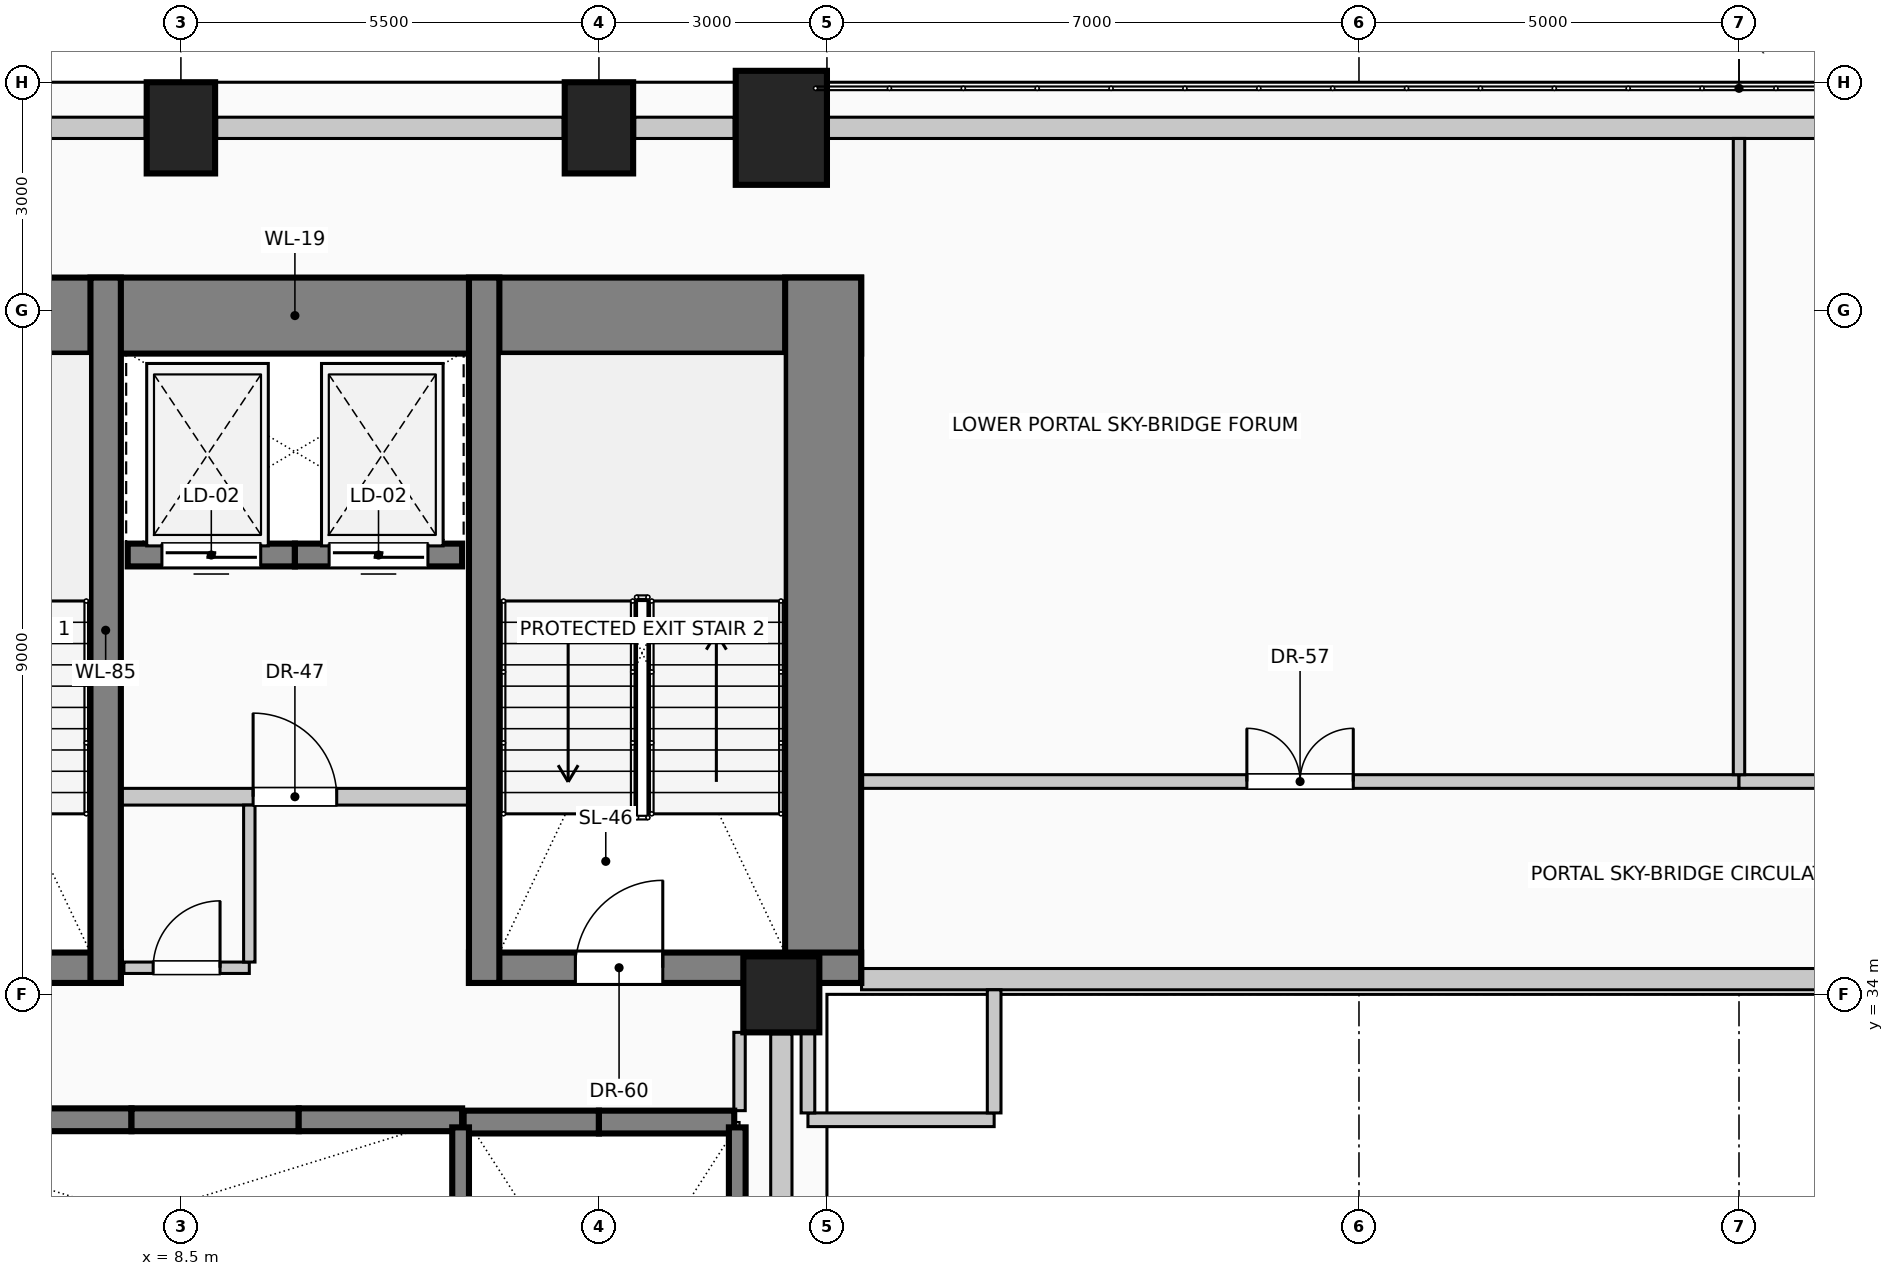
"""IFC4 building model, lengths in metres.
Left out: names, types, materials, properties, quantities, classifications, styles, units other than length and angle.
Written with IfcOpenShell. Run it as: python <this file> out.ifc"""

import sys

from ifc_helpers import new_model, si_unit, direction, frame, frame_2d, origin, origin_2d, place, context, subcontext, project, spatial, rectangle, circle, extrude, element, fill, save


model = new_model("IFC4")
c1 = context("Model", 3, precision=1e-05, world=origin(), true_north=direction((0.0, 1.0)))
c2 = subcontext(c1, "Body", "Model", "MODEL_VIEW")
j1 = project(units=[si_unit("LENGTHUNIT", "METRE"), si_unit("PLANEANGLEUNIT", "RADIAN")], contexts=[c1])
p1 = place(None, origin())
s1 = spatial("IfcSite", under=j1, at=p1, CompositionType="ELEMENT")
p2 = place(p1, origin())
s2 = spatial("IfcBuilding", under=s1, at=p2, CompositionType="ELEMENT")
p3 = place(p2, frame((0.0, 0.0, 42.6)))
s3 = spatial("IfcBuildingStorey", under=s2, at=p3, CompositionType="ELEMENT", Elevation=42.6)
p4 = place(p3, frame((2.55, 42.93, 0.0), z_axis=(0.0, 0.0, 1.0), x_axis=(1.0, 0.0, 0.0)))
e1 = element("IfcWall", 1, at=p4, inside=s3, PredefinedType="SHEAR", context=c2, shape_type="SweptSolid", body=[
    extrude(rectangle(XDim=14.9, YDim=1.0, at=frame_2d((7.45, 0.0))), origin(), (0.0, 0.0, 1.0), 4.0),
])
p5 = place(p3, frame((16.95, 34.15, 0.0), z_axis=(0.0, 0.0, 1.0), x_axis=(0.0, 1.0, 0.0)))
e2 = element("IfcWall", 2, at=p5, inside=s3, PredefinedType="SHEAR", context=c2, shape_type="SweptSolid", body=[
    extrude(rectangle(XDim=9.28, YDim=1.0, at=frame_2d((4.64, 0.0))), origin(), (0.0, 0.0, 1.0), 4.0),
])
p6 = place(p3, frame((2.55, 34.35, 0.0), z_axis=(0.0, 0.0, 1.0), x_axis=(1.0, 0.0, 0.0)))
e3 = element("IfcWall", 3, at=p6, inside=s3, PredefinedType="SHEAR", context=c2, shape_type="SweptSolid", body=[
    extrude(rectangle(XDim=5.16, YDim=0.4, at=frame_2d((2.58, 0.0))), origin(), (0.0, 0.0, 1.0), 4.0),
])
p7 = place(p6, frame((2.4, 0.0, 0.0)))
e4 = element("IfcOpeningElement", 4, at=p7, cuts=e3, PredefinedType="OPENING", context=c2, shape_type="SweptSolid", body=[
    extrude(rectangle(XDim=1.15, YDim=2.2, at=frame_2d((0.575, 1.1))), frame((0.0, 0.21, 0.0), z_axis=(0.0, -1.0, 0.0), x_axis=(1.0, 0.0, 0.0)), (0.0, 0.0, 1.0), 0.42),
])
p8 = place(p3, frame((12.29, 34.35, 0.0), z_axis=(0.0, 0.0, 1.0), x_axis=(1.0, 0.0, 0.0)))
e5 = element("IfcWall", 5, at=p8, inside=s3, PredefinedType="SHEAR", context=c2, shape_type="SweptSolid", body=[
    extrude(rectangle(XDim=5.16, YDim=0.4, at=frame_2d((2.58, 0.0))), origin(), (0.0, 0.0, 1.0), 4.0),
])
p9 = place(p8, frame((1.4, 0.0, 0.0)))
e6 = element("IfcOpeningElement", 6, at=p9, cuts=e5, PredefinedType="OPENING", context=c2, shape_type="SweptSolid", body=[
    extrude(rectangle(XDim=1.15, YDim=2.2, at=frame_2d((0.575, 1.1))), frame((0.0, 0.21, 0.0), z_axis=(0.0, -1.0, 0.0), x_axis=(1.0, 0.0, 0.0)), (0.0, 0.0, 1.0), 0.42),
])
for number, where, z_axis, x_axis in (
    (7, (7.51, 34.15, 0.0), (0.0, 0.0, 1.0), (0.0, 1.0, 0.0)),
    (8, (12.49, 34.15, 0.0), (0.0, 0.0, 1.0), (0.0, 1.0, 0.0)),
):
    element("IfcWall", number, at=place(p3, frame(where, z_axis=z_axis, x_axis=x_axis)), inside=s3, PredefinedType="SHEAR", context=c2, shape_type="SweptSolid", body=[
        extrude(rectangle(XDim=9.28, YDim=0.4, at=frame_2d((4.64, 0.0))), origin(), (0.0, 0.0, 1.0), 4.0),
    ])
for number, where, z_axis, x_axis in (
    (9, (8.5, 45.4, 0.0), (0.0, 0.0, 1.0), (1.0, 0.0, 0.0)),
    (10, (14.0, 45.4, 0.0), (0.0, 0.0, 1.0), (1.0, 0.0, 0.0)),
):
    element("IfcColumn", number, at=place(p3, frame(where, z_axis=z_axis, x_axis=x_axis)), inside=s3, PredefinedType="COLUMN", context=c2, shape_type="SweptSolid", body=[
        extrude(rectangle(XDim=0.9, YDim=1.2, at=origin_2d()), origin(), (0.0, 0.0, 1.0), 4.0),
    ])
p10 = place(p3, frame((16.4, 45.4, 0.0), z_axis=(0.0, 0.0, 1.0), x_axis=(1.0, 0.0, 0.0)))
e11 = element("IfcColumn", 11, at=p10, inside=s3, PredefinedType="COLUMN", context=c2, shape_type="SweptSolid", body=[
    extrude(rectangle(XDim=1.2, YDim=1.5, at=origin_2d()), origin(), (0.0, 0.0, 1.0), 4.0),
])
p11 = place(p3, frame((16.4, 34.0, 0.0), z_axis=(0.0, 0.0, 1.0), x_axis=(1.0, 0.0, 0.0)))
e12 = element("IfcColumn", 12, at=p11, inside=s3, PredefinedType="COLUMN", context=c2, shape_type="SweptSolid", body=[
    extrude(circle(Radius=0.5, at=origin_2d()), origin(), (0.0, 0.0, 1.0), 4.0),
])
p12 = place(p3, frame((4.07, 45.4, 0.0), z_axis=(0.0, 0.0, 1.0), x_axis=(1.0, 0.0, 0.0)))
e13 = element("IfcWall", 13, at=p12, inside=s3, PredefinedType="SOLIDWALL", context=c2, shape_type="SweptSolid", body=[
    extrude(rectangle(XDim=3.96, YDim=0.28, at=frame_2d((1.98, 0.0))), origin(), (0.0, 0.0, 1.0), 2.85),
])
p13 = place(p3, frame((8.97, 45.4, 0.0), z_axis=(0.0, 0.0, 1.0), x_axis=(1.0, 0.0, 0.0)))
e14 = element("IfcWall", 14, at=p13, inside=s3, PredefinedType="SOLIDWALL", context=c2, shape_type="SweptSolid", body=[
    extrude(rectangle(XDim=4.56, YDim=0.28, at=frame_2d((2.28, 0.0))), origin(), (0.0, 0.0, 1.0), 2.85),
])
p14 = place(p3, frame((14.47, 45.4, 0.0), z_axis=(0.0, 0.0, 1.0), x_axis=(1.0, 0.0, 0.0)))
e15 = element("IfcWall", 15, at=p14, inside=s3, PredefinedType="SOLIDWALL", context=c2, shape_type="SweptSolid", body=[
    extrude(rectangle(XDim=1.31, YDim=0.28, at=frame_2d((0.655, 0.0))), origin(), (0.0, 0.0, 1.0), 2.85),
])
p15 = place(p3, frame((17.02, 45.4, 0.0), z_axis=(0.0, 0.0, 1.0), x_axis=(1.0, 0.0, 0.0)))
e16 = element("IfcWall", 16, at=p15, inside=s3, PredefinedType="SOLIDWALL", context=c2, shape_type="SweptSolid", body=[
    extrude(rectangle(XDim=23.96, YDim=0.28, at=frame_2d((11.98, 0.0))), origin(), (0.0, 0.0, 1.0), 0.7),
])
p16 = place(p3, frame((16.4, 33.48, 0.0), z_axis=(0.0, 0.0, 1.0), x_axis=(0.0, -1.0, 0.0)))
e17 = element("IfcWall", 17, at=p16, inside=s3, PredefinedType="SOLIDWALL", context=c2, shape_type="SweptSolid", body=[
    extrude(rectangle(XDim=6.71, YDim=0.28, at=frame_2d((3.355, 0.0))), origin(), (0.0, 0.0, 1.0), 3.0),
])
p17 = place(p3, frame((40.545, 34.2, 0.0), z_axis=(0.0, 0.0, 1.0), x_axis=(-1.0, 0.0, 0.0)))
e18 = element("IfcWall", 18, at=p17, inside=s3, PredefinedType="SOLIDWALL", context=c2, shape_type="SweptSolid", body=[
    extrude(rectangle(XDim=23.09, YDim=0.28, at=frame_2d((11.545, 0.0))), origin(), (0.0, 0.0, 1.0), 0.7),
])
for number, where, z_axis, x_axis in (
    (19, (12.22, 32.32, 0.0), (0.0, 0.0, 1.0), (1.0, 0.0, 0.0)),
    (20, (14.0, 32.32, 0.0), (0.0, 0.0, 1.0), (1.0, 0.0, 0.0)),
):
    element("IfcWall", number, at=place(p3, frame(where, z_axis=z_axis, x_axis=x_axis)), inside=s3, PredefinedType="SOLIDWALL", context=c2, shape_type="SweptSolid", body=[
        extrude(rectangle(XDim=1.78, YDim=0.3, at=frame_2d((0.89, 0.0))), origin(), (0.0, 0.0, 1.0), 4.0),
    ])
p18 = place(p3, frame((5.65, 32.35, 0.0), z_axis=(0.0, 0.0, 1.0), x_axis=(1.0, 0.0, 0.0)))
e21 = element("IfcWall", 21, at=p18, inside=s3, PredefinedType="SOLIDWALL", context=c2, shape_type="SweptSolid", body=[
    extrude(rectangle(XDim=2.2, YDim=0.3, at=frame_2d((1.1, 0.0))), origin(), (0.0, 0.0, 1.0), 4.0),
])
p19 = place(p3, frame((7.85, 32.35, 0.0), z_axis=(0.0, 0.0, 1.0), x_axis=(1.0, 0.0, 0.0)))
e22 = element("IfcWall", 22, at=p19, inside=s3, PredefinedType="SOLIDWALL", context=c2, shape_type="SweptSolid", body=[
    extrude(rectangle(XDim=2.2, YDim=0.3, at=frame_2d((1.1, 0.0))), origin(), (0.0, 0.0, 1.0), 4.0),
])
p20 = place(p3, frame((10.05, 32.35, 0.0), z_axis=(0.0, 0.0, 1.0), x_axis=(1.0, 0.0, 0.0)))
e23 = element("IfcWall", 23, at=p20, inside=s3, PredefinedType="SOLIDWALL", context=c2, shape_type="SweptSolid", body=[
    extrude(rectangle(XDim=2.15, YDim=0.3, at=frame_2d((1.075, 0.0))), origin(), (0.0, 0.0, 1.0), 4.0),
])
p21 = place(p3, frame((10.0, 39.78, 0.0), z_axis=(0.0, 0.0, 1.0), x_axis=(-1.0, 0.0, 0.0)))
e24 = element("IfcWall", 24, at=p21, inside=s3, PredefinedType="SOLIDWALL", context=c2, shape_type="SweptSolid", body=[
    extrude(rectangle(XDim=2.2, YDim=0.3, at=frame_2d((1.1, 0.0))), origin(), (0.0, 0.0, 1.0), 4.0),
])
p22 = place(p21, frame((0.45, 0.0, 0.0)))
e25 = element("IfcOpeningElement", 25, at=p22, cuts=e24, PredefinedType="OPENING", context=c2, shape_type="SweptSolid", body=[
    extrude(rectangle(XDim=1.3, YDim=2.25, at=frame_2d((0.65, 1.125))), frame((0.0, 0.16, 0.0), z_axis=(0.0, -1.0, 0.0), x_axis=(1.0, 0.0, 0.0)), (0.0, 0.0, 1.0), 0.32),
])
p23 = place(p3, frame((12.2, 39.78, 0.0), z_axis=(0.0, 0.0, 1.0), x_axis=(-1.0, 0.0, 0.0)))
e26 = element("IfcWall", 26, at=p23, inside=s3, PredefinedType="SOLIDWALL", context=c2, shape_type="SweptSolid", body=[
    extrude(rectangle(XDim=2.2, YDim=0.3, at=frame_2d((1.1, 0.0))), origin(), (0.0, 0.0, 1.0), 4.0),
])
p24 = place(p23, frame((0.45, 0.0, 0.0)))
e27 = element("IfcOpeningElement", 27, at=p24, cuts=e26, PredefinedType="OPENING", context=c2, shape_type="SweptSolid", body=[
    extrude(rectangle(XDim=1.3, YDim=2.25, at=frame_2d((0.65, 1.125))), frame((0.0, 0.16, 0.0), z_axis=(0.0, -1.0, 0.0), x_axis=(1.0, 0.0, 0.0)), (0.0, 0.0, 1.0), 0.32),
])
for number, where, z_axis, x_axis in (
    (28, (12.18, 26.8, 0.0), (0.0, 0.0, 1.0), (0.0, 1.0, 0.0)),
    (29, (15.82, 26.8, 0.0), (0.0, 0.0, 1.0), (0.0, 1.0, 0.0)),
):
    element("IfcWall", number, at=place(p3, frame(where, z_axis=z_axis, x_axis=x_axis)), inside=s3, PredefinedType="SOLIDWALL", context=c2, shape_type="SweptSolid", body=[
        extrude(rectangle(XDim=5.45, YDim=0.22, at=frame_2d((2.725, 0.0))), origin(), (0.0, 0.0, 1.0), 4.0),
    ])
p25 = place(p3, frame((7.51, 36.6, 0.0), z_axis=(0.0, 0.0, 1.0), x_axis=(1.0, 0.0, 0.0)))
e30 = element("IfcWall", 30, at=p25, inside=s3, PredefinedType="PARTITIONING", context=c2, shape_type="SweptSolid", body=[
    extrude(rectangle(XDim=4.98, YDim=0.22, at=frame_2d((2.49, 0.0))), origin(), (0.0, 0.0, 1.0), 3.7),
])
p26 = place(p25, frame((1.94, 0.0, 0.0)))
e31 = element("IfcOpeningElement", 31, at=p26, cuts=e30, PredefinedType="OPENING", context=c2, shape_type="SweptSolid", body=[
    extrude(rectangle(XDim=1.1, YDim=2.2, at=frame_2d((0.55, 1.1))), frame((0.0, 0.12, 0.0), z_axis=(0.0, -1.0, 0.0), x_axis=(1.0, 0.0, 0.0)), (0.0, 0.0, 1.0), 0.24),
])
p27 = place(p3, frame((16.75, 32.35, 0.0), z_axis=(0.0, 0.0, 1.0), x_axis=(1.0, 0.0, 0.0)))
e32 = element("IfcWall", 32, at=p27, inside=s3, PredefinedType="PARTITIONING", context=c2, shape_type="SweptSolid", body=[
    extrude(rectangle(XDim=2.45, YDim=0.18, at=frame_2d((1.225, 0.0))), origin(), (0.0, 0.0, 1.0), 3.7),
])
p28 = place(p3, frame((7.75, 34.35, 0.0), z_axis=(0.0, 0.0, 1.0), x_axis=(1.0, 0.0, 0.0)))
e33 = element("IfcWall", 33, at=p28, inside=s3, PredefinedType="PARTITIONING", context=c2, shape_type="SweptSolid", body=[
    extrude(rectangle(XDim=1.65, YDim=0.15, at=frame_2d((0.825, 0.0))), origin(), (0.0, 0.0, 1.0), 3.7),
])
p29 = place(p28, frame((0.385, 0.0, 0.0)))
e34 = element("IfcOpeningElement", 34, at=p29, cuts=e33, PredefinedType="OPENING", context=c2, shape_type="SweptSolid", body=[
    extrude(rectangle(XDim=0.88, YDim=2.1, at=frame_2d((0.44, 1.05))), frame((0.0, 0.085, 0.0), z_axis=(0.0, -1.0, 0.0), x_axis=(1.0, 0.0, 0.0)), (0.0, 0.0, 1.0), 0.17),
])
p30 = place(p3, frame((17.45, 36.8, 0.0), z_axis=(0.0, 0.0, 1.0), x_axis=(1.0, 0.0, 0.0)))
e35 = element("IfcWall", 35, at=p30, inside=s3, PredefinedType="PARTITIONING", context=c2, shape_type="SweptSolid", body=[
    extrude(rectangle(XDim=11.55, YDim=0.18, at=frame_2d((5.775, 0.0))), origin(), (0.0, 0.0, 1.0), 3.7),
])
p31 = place(p30, frame((5.075, 0.0, 0.0)))
e36 = element("IfcOpeningElement", 36, at=p31, cuts=e35, PredefinedType="OPENING", context=c2, shape_type="SweptSolid", body=[
    extrude(rectangle(XDim=1.4, YDim=2.2, at=frame_2d((0.7, 1.1))), frame((0.0, 0.1, 0.0), z_axis=(0.0, -1.0, 0.0), x_axis=(1.0, 0.0, 0.0)), (0.0, 0.0, 1.0), 0.2),
])
p32 = place(p3, frame((29.0, 36.8, 0.0), z_axis=(0.0, 0.0, 1.0), x_axis=(1.0, 0.0, 0.0)))
e37 = element("IfcWall", 37, at=p32, inside=s3, PredefinedType="PARTITIONING", context=c2, shape_type="SweptSolid", body=[
    extrude(rectangle(XDim=11.55, YDim=0.18, at=frame_2d((5.775, 0.0))), origin(), (0.0, 0.0, 1.0), 3.7),
])
p33 = place(p32, frame((5.3, 0.0, 0.0)))
e38 = element("IfcOpeningElement", 38, at=p33, cuts=e37, PredefinedType="OPENING", context=c2, shape_type="SweptSolid", body=[
    extrude(rectangle(XDim=0.95, YDim=2.15, at=frame_2d((0.475, 1.075))), frame((0.0, 0.1, 0.0), z_axis=(0.0, -1.0, 0.0), x_axis=(1.0, 0.0, 0.0)), (0.0, 0.0, 1.0), 0.2),
])
p34 = place(p3, frame((9.4, 34.425, 0.0), z_axis=(0.0, 0.0, 1.0), x_axis=(0.0, 1.0, 0.0)))
e39 = element("IfcWall", 39, at=p34, inside=s3, PredefinedType="PARTITIONING", context=c2, shape_type="SweptSolid", body=[
    extrude(rectangle(XDim=2.065, YDim=0.15, at=frame_2d((1.032, 0.0))), origin(), (0.0, 0.0, 1.0), 3.7),
])
p35 = place(p3, frame((15.85, 32.47, 0.0), z_axis=(0.0, 0.0, 1.0), x_axis=(0.0, 1.0, 0.0)))
e40 = element("IfcWall", 40, at=p35, inside=s3, PredefinedType="PARTITIONING", context=c2, shape_type="SweptSolid", body=[
    extrude(rectangle(XDim=1.03, YDim=0.15, at=frame_2d((0.515, 0.0))), origin(), (0.0, 0.0, 1.0), 3.7),
])
p36 = place(p3, frame((16.75, 32.44, 0.0), z_axis=(0.0, 0.0, 1.0), x_axis=(0.0, 1.0, 0.0)))
e41 = element("IfcWall", 41, at=p36, inside=s3, PredefinedType="PARTITIONING", context=c2, shape_type="SweptSolid", body=[
    extrude(rectangle(XDim=1.06, YDim=0.18, at=frame_2d((0.53, 0.0))), origin(), (0.0, 0.0, 1.0), 3.7),
])
p37 = place(p3, frame((19.2, 32.44, 0.0), z_axis=(0.0, 0.0, 1.0), x_axis=(0.0, 1.0, 0.0)))
e42 = element("IfcWall", 42, at=p37, inside=s3, PredefinedType="PARTITIONING", context=c2, shape_type="SweptSolid", body=[
    extrude(rectangle(XDim=1.62, YDim=0.18, at=frame_2d((0.81, 0.0))), origin(), (0.0, 0.0, 1.0), 3.7),
])
p38 = place(p3, frame((29.0, 36.89, 0.0), z_axis=(0.0, 0.0, 1.0), x_axis=(0.0, 1.0, 0.0)))
e43 = element("IfcWall", 43, at=p38, inside=s3, PredefinedType="PARTITIONING", context=c2, shape_type="SweptSolid", body=[
    extrude(rectangle(XDim=8.37, YDim=0.15, at=frame_2d((4.185, 0.0))), origin(), (0.0, 0.0, 1.0), 3.7),
])
p39 = place(p22, origin())
e44 = element("IfcDoor", 44, at=p39, inside=s3, OperationType="SLIDING_TO_LEFT", PredefinedType="DOOR", context=c2, shape_type="SweptSolid", body=[
    extrude(rectangle(XDim=1.3, YDim=2.25, at=frame_2d((0.65, 1.125))), frame((0.0, 0.025, 0.0), z_axis=(0.0, -1.0, 0.0), x_axis=(1.0, 0.0, 0.0)), (0.0, 0.0, 1.0), 0.05),
])
fill(e25, e44)
p40 = place(p24, origin())
e45 = element("IfcDoor", 45, at=p40, inside=s3, OperationType="SLIDING_TO_RIGHT", PredefinedType="DOOR", context=c2, shape_type="SweptSolid", body=[
    extrude(rectangle(XDim=1.3, YDim=2.25, at=frame_2d((0.65, 1.125))), frame((0.0, 0.025, 0.0), z_axis=(0.0, -1.0, 0.0), x_axis=(1.0, 0.0, 0.0)), (0.0, 0.0, 1.0), 0.05),
])
fill(e27, e45)
p41 = place(p9, origin())
e46 = element("IfcDoor", 46, at=p41, inside=s3, OperationType="SINGLE_SWING_RIGHT", PredefinedType="DOOR", context=c2, shape_type="SweptSolid", body=[
    extrude(rectangle(XDim=1.15, YDim=2.2, at=frame_2d((0.575, 1.1))), frame((0.0, 0.025, 0.0), z_axis=(0.0, -1.0, 0.0), x_axis=(1.0, 0.0, 0.0)), (0.0, 0.0, 1.0), 0.05),
])
fill(e6, e46)
p42 = place(p26, origin())
e47 = element("IfcDoor", 47, at=p42, inside=s3, OperationType="SINGLE_SWING_LEFT", PredefinedType="DOOR", context=c2, shape_type="SweptSolid", body=[
    extrude(rectangle(XDim=1.1, YDim=2.2, at=frame_2d((0.55, 1.1))), frame((0.0, 0.025, 0.0), z_axis=(0.0, -1.0, 0.0), x_axis=(1.0, 0.0, 0.0)), (0.0, 0.0, 1.0), 0.05),
])
fill(e31, e47)
p43 = place(p29, origin())
e48 = element("IfcDoor", 48, at=p43, inside=s3, OperationType="SINGLE_SWING_RIGHT", PredefinedType="DOOR", context=c2, shape_type="SweptSolid", body=[
    extrude(rectangle(XDim=0.88, YDim=2.1, at=frame_2d((0.44, 1.05))), frame((0.0, 0.025, 0.0), z_axis=(0.0, -1.0, 0.0), x_axis=(1.0, 0.0, 0.0)), (0.0, 0.0, 1.0), 0.05),
])
fill(e34, e48)
p44 = place(p31, origin())
e49 = element("IfcDoor", 49, at=p44, inside=s3, OperationType="DOUBLE_DOOR_SINGLE_SWING", PredefinedType="DOOR", context=c2, shape_type="SweptSolid", body=[
    extrude(rectangle(XDim=1.4, YDim=2.2, at=frame_2d((0.7, 1.1))), frame((0.0, 0.025, 0.0), z_axis=(0.0, -1.0, 0.0), x_axis=(1.0, 0.0, 0.0)), (0.0, 0.0, 1.0), 0.05),
])
fill(e36, e49)
save(model, sys.argv[1])
